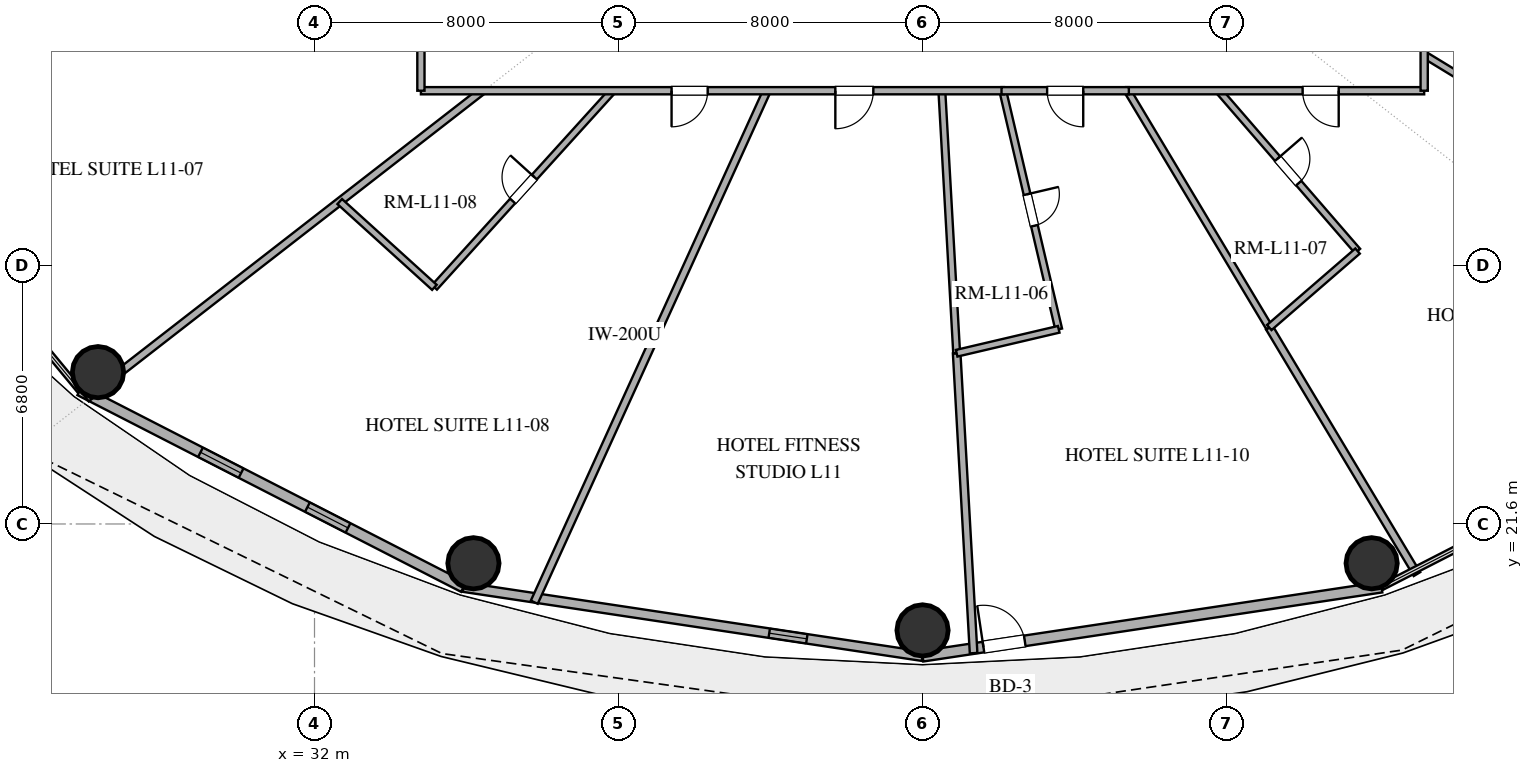
"""IFC4 building model, lengths in metres.
Left out: names, types, materials, properties, quantities, classifications, styles, units other than length and angle.
Written with IfcOpenShell. Run it as: python <this file> out.ifc"""

import sys

from ifc_helpers import new_model, si_unit, direction, frame, frame_2d, origin, origin_2d, place, context, subcontext, project, spatial, rectangle, hollow_circle, extrude, element, fill, save


model = new_model("IFC4")
c1 = context("Model", 3, precision=1e-05, world=origin(), true_north=direction((0.0, 1.0)))
c2 = subcontext(c1, "Body", "Model", "MODEL_VIEW")
j1 = project(units=[si_unit("LENGTHUNIT", "METRE"), si_unit("PLANEANGLEUNIT", "RADIAN")], contexts=[c1])
p1 = place(None, origin())
s1 = spatial("IfcSite", under=j1, at=p1, CompositionType="ELEMENT")
p2 = place(p1, origin())
s2 = spatial("IfcBuilding", under=s1, at=p2, CompositionType="ELEMENT")
p3 = place(p2, frame((0.0, 0.0, 49.8)))
s3 = spatial("IfcBuildingStorey", under=s2, at=p3, CompositionType="ELEMENT", Elevation=49.8)
for number, where, z_axis, x_axis in (
    (1, (26.303, 25.595, 0.0), (0.0, 0.0, 1.0), (1.0, 0.0, 0.0)),
    (2, (36.182, 20.566, 0.0), (0.0, 0.0, 1.0), (1.0, 0.0, 0.0)),
    (3, (48.0, 18.8, 0.0), (0.0, 0.0, 1.0), (1.0, 0.0, 0.0)),
    (4, (59.818, 20.566, 0.0), (0.0, 0.0, 1.0), (1.0, 0.0, 0.0)),
):
    element("IfcColumn", number, at=place(p3, frame(where, z_axis=z_axis, x_axis=x_axis)), inside=s3, PredefinedType="COLUMN", context=c2, shape_type="SweptSolid", body=[
        extrude(hollow_circle(Radius=0.675, WallThickness=0.036, at=origin_2d()), origin(), (0.0, 0.0, 1.0), 3.38),
    ])
p4 = place(p3, frame((25.826, 25.114, 0.0), z_axis=(0.0, 0.0, 1.0), x_axis=(0.889853976658, -0.456245438581, 0.0)))
e5 = element("IfcWall", 5, at=p4, inside=s3, PredefinedType="SOLIDWALL", context=c2, shape_type="SweptSolid", body=[
    extrude(rectangle(XDim=11.346, YDim=0.28, at=frame_2d((5.673, 0.0))), origin(), (0.0, 0.0, 1.0), 3.38),
])
p5 = place(p4, frame((3.567, 0.0, 0.85)))
e6 = element("IfcOpeningElement", 6, at=p5, cuts=e5, PredefinedType="OPENING", context=c2, shape_type="SweptSolid", body=[
    extrude(rectangle(XDim=1.2, YDim=1.8, at=frame_2d((0.6, 0.9))), frame((0.0, 0.15, 0.0), z_axis=(0.0, -1.0, 0.0), x_axis=(1.0, 0.0, 0.0)), (0.0, 0.0, 1.0), 0.3),
])
p6 = place(p4, frame((6.729, 0.0, 0.85)))
e7 = element("IfcOpeningElement", 7, at=p6, cuts=e5, PredefinedType="OPENING", context=c2, shape_type="SweptSolid", body=[
    extrude(rectangle(XDim=1.2, YDim=1.8, at=frame_2d((0.6, 0.9))), frame((0.0, 0.15, 0.0), z_axis=(0.0, -1.0, 0.0), x_axis=(1.0, 0.0, 0.0)), (0.0, 0.0, 1.0), 0.3),
])
p7 = place(p3, frame((35.922, 19.938, 0.0), z_axis=(0.0, 0.0, 1.0), x_axis=(0.988864835849, -0.148816452121, 0.0)))
e8 = element("IfcWall", 8, at=p7, inside=s3, PredefinedType="SOLIDWALL", context=c2, shape_type="SweptSolid", body=[
    extrude(rectangle(XDim=12.214, YDim=0.25, at=frame_2d((6.107, 0.0))), origin(), (0.0, 0.0, 1.0), 3.38),
])
p8 = place(p7, frame((8.135, 0.0, 1.42)))
e9 = element("IfcOpeningElement", 9, at=p8, cuts=e8, PredefinedType="OPENING", context=c2, shape_type="SweptSolid", body=[
    extrude(rectangle(XDim=1.0, YDim=1.05, at=frame_2d((0.5, 0.525))), frame((0.0, 0.135, 0.0), z_axis=(0.0, -1.0, 0.0), x_axis=(1.0, 0.0, 0.0)), (0.0, 0.0, 1.0), 0.27),
])
p9 = place(p3, frame((48.0, 18.12, 0.0), z_axis=(0.0, 0.0, 1.0), x_axis=(0.988864835849, 0.148816452121, 0.0)))
e10 = element("IfcWall", 10, at=p9, inside=s3, PredefinedType="SOLIDWALL", context=c2, shape_type="SweptSolid", body=[
    extrude(rectangle(XDim=12.214, YDim=0.28, at=frame_2d((6.107, 0.0))), origin(), (0.0, 0.0, 1.0), 3.38),
])
p10 = place(p9, frame((1.621, 0.0, 0.0)))
e11 = element("IfcOpeningElement", 11, at=p10, cuts=e10, PredefinedType="OPENING", context=c2, shape_type="SweptSolid", body=[
    extrude(rectangle(XDim=1.1, YDim=2.25, at=frame_2d((0.55, 1.125))), frame((0.0, 0.15, 0.0), z_axis=(0.0, -1.0, 0.0), x_axis=(1.0, 0.0, 0.0)), (0.0, 0.0, 1.0), 0.3),
])
p11 = place(p3, frame((37.783, 19.541, 0.0), z_axis=(0.0, 0.0, 1.0), x_axis=(0.414087801136, 0.910236943301, 0.0)))
e12 = element("IfcWall", 12, at=p11, inside=s3, PredefinedType="PARTITIONING", context=c2, shape_type="SweptSolid", body=[
    extrude(rectangle(XDim=14.786, YDim=0.2, at=frame_2d((7.393, 0.0))), origin(), (0.0, 0.0, 1.0), 2.74),
])
p12 = place(p3, frame((36.417, 33.0, 0.0), z_axis=(0.0, 0.0, 1.0), x_axis=(-0.789656987139, -0.613548565855, 0.0)))
e13 = element("IfcWall", 13, at=p12, inside=s3, PredefinedType="PARTITIONING", context=c2, shape_type="SweptSolid", body=[
    extrude(rectangle(XDim=13.195, YDim=0.2, at=frame_2d((6.597, 0.0))), origin(), (0.0, 0.0, 1.0), 2.74),
])
p13 = place(p3, frame((49.344, 18.201, 0.0), z_axis=(0.0, 0.0, 1.0), x_axis=(-0.056375038978, 0.998409662904, 0.0)))
e14 = element("IfcWall", 14, at=p13, inside=s3, PredefinedType="PARTITIONING", context=c2, shape_type="SweptSolid", body=[
    extrude(rectangle(XDim=7.903, YDim=0.2, at=frame_2d((3.952, 0.0))), origin(), (0.0, 0.0, 1.0), 2.74),
])
p14 = place(p3, frame((61.01, 20.281, 0.0), z_axis=(0.0, 0.0, 1.0), x_axis=(-0.513892719639, 0.857854458928, 0.0)))
e15 = element("IfcWall", 15, at=p14, inside=s3, PredefinedType="PARTITIONING", context=c2, shape_type="SweptSolid", body=[
    extrude(rectangle(XDim=7.563, YDim=0.2, at=frame_2d((3.781, 0.0))), origin(), (0.0, 0.0, 1.0), 2.74),
])
p15 = place(p3, frame((57.124, 26.769, 0.0), z_axis=(0.0, 0.0, 1.0), x_axis=(-0.513872793929, 0.857866394994, 0.0)))
e16 = element("IfcWall", 16, at=p15, inside=s3, PredefinedType="PLUMBINGWALL", context=c2, shape_type="SweptSolid", body=[
    extrude(rectangle(XDim=7.263, YDim=0.18, at=frame_2d((3.632, 0.0))), origin(), (0.0, 0.0, 1.0), 2.74),
])
p16 = place(p3, frame((35.155, 27.826, 0.0), z_axis=(0.0, 0.0, 1.0), x_axis=(0.671533822983, 0.740973902773, 0.0)))
e17 = element("IfcWall", 17, at=p16, inside=s3, PredefinedType="PLUMBINGWALL", context=c2, shape_type="SweptSolid", body=[
    extrude(rectangle(XDim=6.982, YDim=0.18, at=frame_2d((3.491, 0.0))), origin(), (0.0, 0.0, 1.0), 2.74),
])
p17 = place(p16, frame((3.066, 0.0, 0.0)))
e18 = element("IfcOpeningElement", 18, at=p17, cuts=e17, PredefinedType="OPENING", context=c2, shape_type="SweptSolid", body=[
    extrude(rectangle(XDim=0.85, YDim=2.1, at=frame_2d((0.425, 1.05))), frame((0.0, 0.1, 0.0), z_axis=(0.0, -1.0, 0.0), x_axis=(1.0, 0.0, 0.0)), (0.0, 0.0, 1.0), 0.2),
])
p18 = place(p3, frame((48.898, 26.092, 0.0), z_axis=(0.0, 0.0, 1.0), x_axis=(-0.056353367692, 0.998410886334, 0.0)))
e19 = element("IfcWall", 19, at=p18, inside=s3, PredefinedType="PLUMBINGWALL", context=c2, shape_type="SweptSolid", body=[
    extrude(rectangle(XDim=6.919, YDim=0.18, at=frame_2d((3.459, 0.0))), origin(), (0.0, 0.0, 1.0), 2.74),
])
p19 = place(p3, frame((50.111, 33.0, 0.0), z_axis=(0.0, 0.0, 1.0), x_axis=(0.228380862789, -0.973571867666, 0.0)))
e20 = element("IfcWall", 20, at=p19, inside=s3, PredefinedType="PLUMBINGWALL", context=c2, shape_type="SweptSolid", body=[
    extrude(rectangle(XDim=6.448, YDim=0.18, at=frame_2d((3.224, 0.0))), origin(), (0.0, 0.0, 1.0), 2.74),
])
p20 = place(p19, frame((2.799, 0.0, 0.0)))
e21 = element("IfcOpeningElement", 21, at=p20, cuts=e20, PredefinedType="OPENING", context=c2, shape_type="SweptSolid", body=[
    extrude(rectangle(XDim=0.85, YDim=2.1, at=frame_2d((0.425, 1.05))), frame((0.0, 0.1, 0.0), z_axis=(0.0, -1.0, 0.0), x_axis=(1.0, 0.0, 0.0)), (0.0, 0.0, 1.0), 0.2),
])
p21 = place(p3, frame((66.323, 30.822, 0.0), z_axis=(0.0, 0.0, 1.0), x_axis=(-0.853693843866, 0.52077521153, 0.0)))
e22 = element("IfcWall", 22, at=p21, inside=s3, PredefinedType="PLUMBINGWALL", context=c2, shape_type="SweptSolid", body=[
    extrude(rectangle(XDim=6.002, YDim=0.18, at=frame_2d((3.001, 0.0))), origin(), (0.0, 0.0, 1.0), 2.74),
])
p22 = place(p3, frame((55.794, 33.0, 0.0), z_axis=(0.0, 0.0, 1.0), x_axis=(0.654630697525, -0.755948840767, 0.0)))
e23 = element("IfcWall", 23, at=p22, inside=s3, PredefinedType="PLUMBINGWALL", context=c2, shape_type="SweptSolid", body=[
    extrude(rectangle(XDim=5.581, YDim=0.18, at=frame_2d((2.791, 0.0))), origin(), (0.0, 0.0, 1.0), 2.74),
])
p23 = place(p22, frame((2.365, 0.0, 0.0)))
e24 = element("IfcOpeningElement", 24, at=p23, cuts=e23, PredefinedType="OPENING", context=c2, shape_type="SweptSolid", body=[
    extrude(rectangle(XDim=0.85, YDim=2.1, at=frame_2d((0.425, 1.05))), frame((0.0, 0.1, 0.0), z_axis=(0.0, -1.0, 0.0), x_axis=(1.0, 0.0, 0.0)), (0.0, 0.0, 1.0), 0.2),
])
p24 = place(p3, frame((61.2, 33.0, 0.0), z_axis=(0.0, 0.0, 1.0), x_axis=(-1.0, 0.0, 0.0)))
e25 = element("IfcWall", 25, at=p24, inside=s3, PredefinedType="PARTITIONING", context=c2, shape_type="SweptSolid", body=[
    extrude(rectangle(XDim=7.846, YDim=0.19, at=frame_2d((3.923, 0.0))), origin(), (0.0, 0.0, 1.0), 2.74),
])
p25 = place(p24, frame((2.249, 0.0, 0.0)))
e26 = element("IfcOpeningElement", 26, at=p25, cuts=e25, PredefinedType="OPENING", context=c2, shape_type="SweptSolid", body=[
    extrude(rectangle(XDim=0.95, YDim=2.15, at=frame_2d((0.475, 1.075))), frame((0.0, 0.105, 0.0), z_axis=(0.0, -1.0, 0.0), x_axis=(1.0, 0.0, 0.0)), (0.0, 0.0, 1.0), 0.21),
])
p26 = place(p3, frame((50.144, 33.0, 0.0), z_axis=(0.0, 0.0, 1.0), x_axis=(-1.0, 0.0, 0.0)))
e27 = element("IfcWall", 27, at=p26, inside=s3, PredefinedType="PARTITIONING", context=c2, shape_type="SweptSolid", body=[
    extrude(rectangle(XDim=15.344, YDim=0.19, at=frame_2d((7.672, 0.0))), origin(), (0.0, 0.0, 1.0), 2.74),
])
p27 = place(p26, frame((3.438, 0.0, 0.0)))
e28 = element("IfcOpeningElement", 28, at=p27, cuts=e27, PredefinedType="OPENING", context=c2, shape_type="SweptSolid", body=[
    extrude(rectangle(XDim=1.0, YDim=2.2, at=frame_2d((0.5, 1.1))), frame((0.0, 0.105, 0.0), z_axis=(0.0, -1.0, 0.0), x_axis=(1.0, 0.0, 0.0)), (0.0, 0.0, 1.0), 0.21),
])
p28 = place(p26, frame((7.798, 0.0, 0.0)))
e29 = element("IfcOpeningElement", 29, at=p28, cuts=e27, PredefinedType="OPENING", context=c2, shape_type="SweptSolid", body=[
    extrude(rectangle(XDim=0.95, YDim=2.15, at=frame_2d((0.475, 1.075))), frame((0.0, 0.105, 0.0), z_axis=(0.0, -1.0, 0.0), x_axis=(1.0, 0.0, 0.0)), (0.0, 0.0, 1.0), 0.21),
])
p29 = place(p3, frame((61.2, 41.18, 0.0), z_axis=(0.0, 0.0, 1.0), x_axis=(0.0, -1.0, 0.0)))
e30 = element("IfcWall", 30, at=p29, inside=s3, PredefinedType="PARTITIONING", context=c2, shape_type="SweptSolid", body=[
    extrude(rectangle(XDim=8.18, YDim=0.19, at=frame_2d((4.09, 0.0))), origin(), (0.0, 0.0, 1.0), 2.74),
])
p30 = place(p29, frame((1.721, 0.0, 0.0)))
e31 = element("IfcOpeningElement", 31, at=p30, cuts=e30, PredefinedType="OPENING", context=c2, shape_type="SweptSolid", body=[
    extrude(rectangle(XDim=0.95, YDim=2.15, at=frame_2d((0.475, 1.075))), frame((0.0, 0.105, 0.0), z_axis=(0.0, -1.0, 0.0), x_axis=(1.0, 0.0, 0.0)), (0.0, 0.0, 1.0), 0.21),
])
p31 = place(p3, frame((34.8, 33.0, 0.0), z_axis=(0.0, 0.0, 1.0), x_axis=(0.0, 1.0, 0.0)))
e32 = element("IfcWall", 32, at=p31, inside=s3, PredefinedType="PARTITIONING", context=c2, shape_type="SweptSolid", body=[
    extrude(rectangle(XDim=6.668, YDim=0.19, at=frame_2d((3.334, 0.0))), origin(), (0.0, 0.0, 1.0), 2.74),
])
p32 = place(p31, frame((1.624, 0.0, 0.0)))
e33 = element("IfcOpeningElement", 33, at=p32, cuts=e32, PredefinedType="OPENING", context=c2, shape_type="SweptSolid", body=[
    extrude(rectangle(XDim=0.95, YDim=2.15, at=frame_2d((0.475, 1.075))), frame((0.0, 0.105, 0.0), z_axis=(0.0, -1.0, 0.0), x_axis=(1.0, 0.0, 0.0)), (0.0, 0.0, 1.0), 0.21),
])
p33 = place(p3, frame((32.664, 30.084, 0.0), z_axis=(0.0, 0.0, 1.0), x_axis=(0.740964368308, -0.67154434321, 0.0)))
e34 = element("IfcWall", 34, at=p33, inside=s3, PredefinedType="PLUMBINGWALL", context=c2, shape_type="SweptSolid", body=[
    extrude(rectangle(XDim=3.362, YDim=0.18, at=frame_2d((1.681, 0.0))), origin(), (0.0, 0.0, 1.0), 2.74),
])
p34 = place(p3, frame((53.429, 33.0, 0.0), z_axis=(0.0, 0.0, 1.0), x_axis=(-1.0, 0.0, 0.0)))
e35 = element("IfcWall", 35, at=p34, inside=s3, PredefinedType="PARTITIONING", context=c2, shape_type="SweptSolid", body=[
    extrude(rectangle(XDim=3.351, YDim=0.19, at=frame_2d((1.675, 0.0))), origin(), (0.0, 0.0, 1.0), 2.74),
])
p35 = place(p34, frame((1.2, 0.0, 0.0)))
e36 = element("IfcOpeningElement", 36, at=p35, cuts=e35, PredefinedType="OPENING", context=c2, shape_type="SweptSolid", body=[
    extrude(rectangle(XDim=0.95, YDim=2.15, at=frame_2d((0.475, 1.075))), frame((0.0, 0.105, 0.0), z_axis=(0.0, -1.0, 0.0), x_axis=(1.0, 0.0, 0.0)), (0.0, 0.0, 1.0), 0.21),
])
p36 = place(p3, frame((59.447, 28.781, 0.0), z_axis=(0.0, 0.0, 1.0), x_axis=(-0.755927521829, -0.654655315217, 0.0)))
e37 = element("IfcWall", 37, at=p36, inside=s3, PredefinedType="PLUMBINGWALL", context=c2, shape_type="SweptSolid", body=[
    extrude(rectangle(XDim=3.074, YDim=0.18, at=frame_2d((1.537, 0.0))), origin(), (0.0, 0.0, 1.0), 2.74),
])
p37 = place(p3, frame((51.583, 26.722, 0.0), z_axis=(0.0, 0.0, 1.0), x_axis=(-0.973579428385, -0.228348629567, 0.0)))
e38 = element("IfcWall", 38, at=p37, inside=s3, PredefinedType="PLUMBINGWALL", context=c2, shape_type="SweptSolid", body=[
    extrude(rectangle(XDim=2.759, YDim=0.18, at=frame_2d((1.379, 0.0))), origin(), (0.0, 0.0, 1.0), 2.74),
])
p38 = place(p5, origin())
e39 = element("IfcWindow", 39, at=p38, inside=s3, PartitioningType="SINGLE_PANEL", PredefinedType="WINDOW", context=c2, shape_type="SweptSolid", body=[
    extrude(rectangle(XDim=1.2, YDim=1.8, at=frame_2d((0.6, 0.9))), frame((0.0, 0.03, 0.0), z_axis=(0.0, -1.0, 0.0), x_axis=(1.0, 0.0, 0.0)), (0.0, 0.0, 1.0), 0.06),
])
fill(e6, e39)
p39 = place(p6, origin())
e40 = element("IfcWindow", 40, at=p39, inside=s3, PartitioningType="SINGLE_PANEL", PredefinedType="WINDOW", context=c2, shape_type="SweptSolid", body=[
    extrude(rectangle(XDim=1.2, YDim=1.8, at=frame_2d((0.6, 0.9))), frame((0.0, 0.03, 0.0), z_axis=(0.0, -1.0, 0.0), x_axis=(1.0, 0.0, 0.0)), (0.0, 0.0, 1.0), 0.06),
])
fill(e7, e40)
p40 = place(p10, origin())
e41 = element("IfcDoor", 41, at=p40, inside=s3, OperationType="SINGLE_SWING_LEFT", PredefinedType="DOOR", context=c2, shape_type="SweptSolid", body=[
    extrude(rectangle(XDim=1.1, YDim=2.25, at=frame_2d((0.55, 1.125))), frame((0.0, 0.025, 0.0), z_axis=(0.0, -1.0, 0.0), x_axis=(1.0, 0.0, 0.0)), (0.0, 0.0, 1.0), 0.05),
])
fill(e11, e41)
p41 = place(p8, origin())
e42 = element("IfcWindow", 42, at=p41, inside=s3, PartitioningType="SINGLE_PANEL", PredefinedType="WINDOW", context=c2, shape_type="SweptSolid", body=[
    extrude(rectangle(XDim=1.0, YDim=1.05, at=frame_2d((0.5, 0.525))), frame((0.0, 0.03, 0.0), z_axis=(0.0, -1.0, 0.0), x_axis=(1.0, 0.0, 0.0)), (0.0, 0.0, 1.0), 0.06),
])
fill(e9, e42)
p42 = place(p17, origin())
e43 = element("IfcDoor", 43, at=p42, inside=s3, OperationType="SINGLE_SWING_RIGHT", PredefinedType="DOOR", context=c2, shape_type="SweptSolid", body=[
    extrude(rectangle(XDim=0.85, YDim=2.1, at=frame_2d((0.425, 1.05))), frame((0.0, 0.025, 0.0), z_axis=(0.0, -1.0, 0.0), x_axis=(1.0, 0.0, 0.0)), (0.0, 0.0, 1.0), 0.05),
])
fill(e18, e43)
p43 = place(p20, origin())
e44 = element("IfcDoor", 44, at=p43, inside=s3, OperationType="SINGLE_SWING_LEFT", PredefinedType="DOOR", context=c2, shape_type="SweptSolid", body=[
    extrude(rectangle(XDim=0.85, YDim=2.1, at=frame_2d((0.425, 1.05))), frame((0.0, 0.025, 0.0), z_axis=(0.0, -1.0, 0.0), x_axis=(1.0, 0.0, 0.0)), (0.0, 0.0, 1.0), 0.05),
])
fill(e21, e44)
p44 = place(p23, origin())
e45 = element("IfcDoor", 45, at=p44, inside=s3, OperationType="SINGLE_SWING_LEFT", PredefinedType="DOOR", context=c2, shape_type="SweptSolid", body=[
    extrude(rectangle(XDim=0.85, YDim=2.1, at=frame_2d((0.425, 1.05))), frame((0.0, 0.025, 0.0), z_axis=(0.0, -1.0, 0.0), x_axis=(1.0, 0.0, 0.0)), (0.0, 0.0, 1.0), 0.05),
])
fill(e24, e45)
p45 = place(p25, origin())
e46 = element("IfcDoor", 46, at=p45, inside=s3, OperationType="SINGLE_SWING_LEFT", PredefinedType="DOOR", context=c2, shape_type="SweptSolid", body=[
    extrude(rectangle(XDim=0.95, YDim=2.15, at=frame_2d((0.475, 1.075))), frame((0.0, 0.025, 0.0), z_axis=(0.0, -1.0, 0.0), x_axis=(1.0, 0.0, 0.0)), (0.0, 0.0, 1.0), 0.05),
])
fill(e26, e46)
p46 = place(p27, origin())
e47 = element("IfcDoor", 47, at=p46, inside=s3, OperationType="SINGLE_SWING_RIGHT", PredefinedType="DOOR", context=c2, shape_type="SweptSolid", body=[
    extrude(rectangle(XDim=1.0, YDim=2.2, at=frame_2d((0.5, 1.1))), frame((0.0, 0.025, 0.0), z_axis=(0.0, -1.0, 0.0), x_axis=(1.0, 0.0, 0.0)), (0.0, 0.0, 1.0), 0.05),
])
fill(e28, e47)
p47 = place(p28, origin())
e48 = element("IfcDoor", 48, at=p47, inside=s3, OperationType="SINGLE_SWING_RIGHT", PredefinedType="DOOR", context=c2, shape_type="SweptSolid", body=[
    extrude(rectangle(XDim=0.95, YDim=2.15, at=frame_2d((0.475, 1.075))), frame((0.0, 0.025, 0.0), z_axis=(0.0, -1.0, 0.0), x_axis=(1.0, 0.0, 0.0)), (0.0, 0.0, 1.0), 0.05),
])
fill(e29, e48)
p48 = place(p35, origin())
e49 = element("IfcDoor", 49, at=p48, inside=s3, OperationType="SINGLE_SWING_LEFT", PredefinedType="DOOR", context=c2, shape_type="SweptSolid", body=[
    extrude(rectangle(XDim=0.95, YDim=2.15, at=frame_2d((0.475, 1.075))), frame((0.0, 0.025, 0.0), z_axis=(0.0, -1.0, 0.0), x_axis=(1.0, 0.0, 0.0)), (0.0, 0.0, 1.0), 0.05),
])
fill(e36, e49)
save(model, sys.argv[1])
